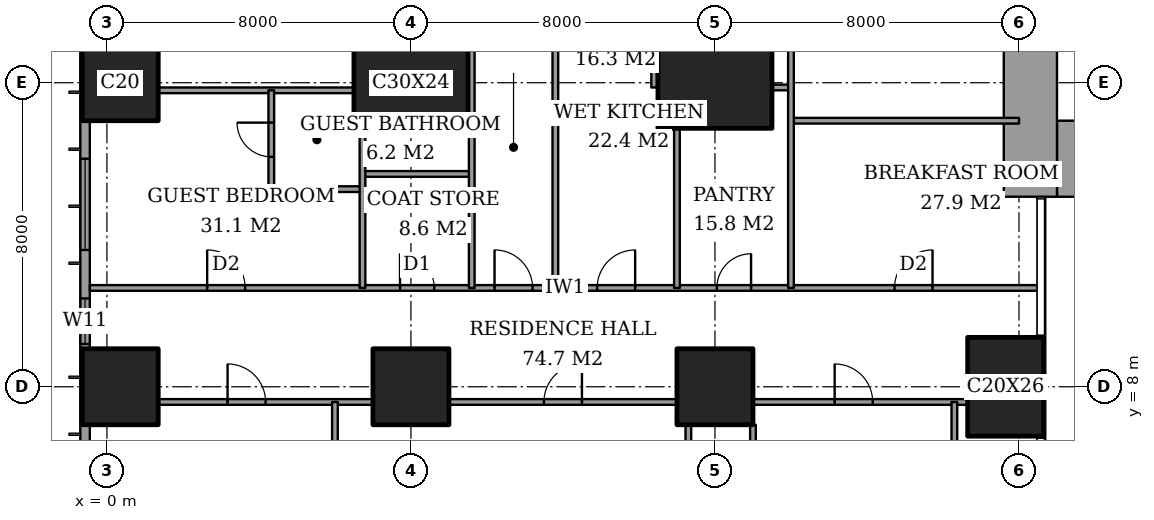
"""IFC4 building model, lengths in metres.
Left out: names, types, materials, properties, quantities, classifications, styles, units other than length and angle.
Written with IfcOpenShell. Run it as: python <this file> out.ifc"""

import sys

from ifc_helpers import new_model, si_unit, direction, frame, frame_2d, origin, origin_2d, place, context, subcontext, project, spatial, rectangle, extrude, element, fill, save


model = new_model("IFC4")
c1 = context("Model", 3, precision=1e-05, world=origin(), true_north=direction((0.0, 1.0)))
c2 = subcontext(c1, "Body", "Model", "MODEL_VIEW")
j1 = project(units=[si_unit("LENGTHUNIT", "METRE"), si_unit("PLANEANGLEUNIT", "RADIAN")], contexts=[c1])
p1 = place(None, origin())
s1 = spatial("IfcSite", under=j1, at=p1, CompositionType="ELEMENT")
p2 = place(p1, origin())
s2 = spatial("IfcBuilding", under=s1, at=p2, CompositionType="ELEMENT")
p3 = place(p2, frame((0.0, 0.0, 114.2)))
s3 = spatial("IfcBuildingStorey", under=s2, at=p3, CompositionType="ELEMENT", Elevation=114.2)
for number, where, z_axis, x_axis in (
    (1, (0.35, 8.0, 0.0), (0.0, 0.0, 1.0), (1.0, 0.0, 0.0)),
    (2, (0.35, 16.0, 0.0), (0.0, 0.0, 1.0), (1.0, 0.0, 0.0)),
    (3, (8.0, 8.0, 0.0), (0.0, 0.0, 1.0), (1.0, 0.0, 0.0)),
):
    element("IfcColumn", number, at=place(p3, frame(where, z_axis=z_axis, x_axis=x_axis)), inside=s3, PredefinedType="COLUMN", context=c2, shape_type="SweptSolid", body=[
        extrude(rectangle(XDim=2.0, YDim=2.0, at=origin_2d()), origin(), (0.0, 0.0, 1.0), 3.6),
    ])
p4 = place(p3, frame((8.0, 16.0, 0.0), z_axis=(0.0, 0.0, 1.0), x_axis=(1.0, 0.0, 0.0)))
e4 = element("IfcColumn", 4, at=p4, inside=s3, PredefinedType="COLUMN", context=c2, shape_type="SweptSolid", body=[
    extrude(rectangle(XDim=3.0, YDim=2.4, at=origin_2d()), origin(), (0.0, 0.0, 1.0), 3.6),
])
p5 = place(p3, frame((16.0, 8.0, 0.0), z_axis=(0.0, 0.0, 1.0), x_axis=(1.0, 0.0, 0.0)))
e5 = element("IfcColumn", 5, at=p5, inside=s3, PredefinedType="COLUMN", context=c2, shape_type="SweptSolid", body=[
    extrude(rectangle(XDim=2.0, YDim=2.0, at=origin_2d()), origin(), (0.0, 0.0, 1.0), 3.6),
])
p6 = place(p3, frame((16.0, 16.0, 0.0), z_axis=(0.0, 0.0, 1.0), x_axis=(1.0, 0.0, 0.0)))
e6 = element("IfcColumn", 6, at=p6, inside=s3, PredefinedType="COLUMN", context=c2, shape_type="SweptSolid", body=[
    extrude(rectangle(XDim=3.0, YDim=2.4, at=origin_2d()), origin(), (0.0, 0.0, 1.0), 3.6),
])
p7 = place(p3, frame((23.65, 8.0, 0.0), z_axis=(0.0, 0.0, 1.0), x_axis=(1.0, 0.0, 0.0)))
e7 = element("IfcColumn", 7, at=p7, inside=s3, PredefinedType="COLUMN", context=c2, shape_type="SweptSolid", body=[
    extrude(rectangle(XDim=2.0, YDim=2.6, at=origin_2d()), origin(), (0.0, 0.0, 1.0), 3.6),
])
p8 = place(p3, frame((25.0, 14.0, 0.0), z_axis=(0.0, 0.0, 1.0), x_axis=(1.0, 0.0, 0.0)))
e8 = element("IfcWall", 8, at=p8, inside=s3, PredefinedType="SHEAR", context=c2, shape_type="SweptSolid", body=[
    extrude(rectangle(XDim=3.15, YDim=2.0, at=frame_2d((1.575, 0.0))), origin(), (0.0, 0.0, 1.0), 3.6),
])
p9 = place(p3, frame((24.3, 13.0, 0.0), z_axis=(0.0, 0.0, 1.0), x_axis=(0.0, 1.0, 0.0)))
e9 = element("IfcWall", 9, at=p9, inside=s3, PredefinedType="SHEAR", context=c2, shape_type="SweptSolid", body=[
    extrude(rectangle(XDim=10.15, YDim=1.4, at=frame_2d((5.075, 0.0))), origin(), (0.0, 0.0, 1.0), 3.6),
])
p10 = place(p3, frame((-0.575, 44.825, 0.0), z_axis=(0.0, 0.0, 1.0), x_axis=(0.0, -1.0, 0.0)))
e10 = element("IfcWall", 10, at=p10, inside=s3, PredefinedType="SOLIDWALL", context=c2, shape_type="SweptSolid", body=[
    extrude(rectangle(XDim=41.65, YDim=0.25, at=frame_2d((20.825, 0.0))), origin(), (0.0, 0.0, 1.0), 3.6),
])
p11 = place(p10, frame((0.775, 0.0, 0.4)))
e11 = element("IfcOpeningElement", 11, at=p11, cuts=e10, PredefinedType="OPENING", context=c2, shape_type="SweptSolid", body=[
    extrude(rectangle(XDim=2.4, YDim=2.2, at=frame_2d((1.2, 1.1))), frame((0.0, 0.135, 0.0), z_axis=(0.0, -1.0, 0.0), x_axis=(1.0, 0.0, 0.0)), (0.0, 0.0, 1.0), 0.27),
])
p12 = place(p10, frame((6.2, 0.0, 0.4)))
e12 = element("IfcOpeningElement", 12, at=p12, cuts=e10, PredefinedType="OPENING", context=c2, shape_type="SweptSolid", body=[
    extrude(rectangle(XDim=1.2, YDim=2.2, at=frame_2d((0.6, 1.1))), frame((0.0, 0.135, 0.0), z_axis=(0.0, -1.0, 0.0), x_axis=(1.0, 0.0, 0.0)), (0.0, 0.0, 1.0), 0.27),
])
p13 = place(p10, frame((8.525, 0.0, 0.4)))
e13 = element("IfcOpeningElement", 13, at=p13, cuts=e10, PredefinedType="OPENING", context=c2, shape_type="SweptSolid", body=[
    extrude(rectangle(XDim=2.4, YDim=2.2, at=frame_2d((1.2, 1.1))), frame((0.0, 0.135, 0.0), z_axis=(0.0, -1.0, 0.0), x_axis=(1.0, 0.0, 0.0)), (0.0, 0.0, 1.0), 0.27),
])
p14 = place(p10, frame((15.625, 0.0, 0.4)))
e14 = element("IfcOpeningElement", 14, at=p14, cuts=e10, PredefinedType="OPENING", context=c2, shape_type="SweptSolid", body=[
    extrude(rectangle(XDim=2.4, YDim=2.2, at=frame_2d((1.2, 1.1))), frame((0.0, 0.135, 0.0), z_axis=(0.0, -1.0, 0.0), x_axis=(1.0, 0.0, 0.0)), (0.0, 0.0, 1.0), 0.27),
])
p15 = place(p10, frame((23.625, 0.0, 0.4)))
e15 = element("IfcOpeningElement", 15, at=p15, cuts=e10, PredefinedType="OPENING", context=c2, shape_type="SweptSolid", body=[
    extrude(rectangle(XDim=2.4, YDim=2.2, at=frame_2d((1.2, 1.1))), frame((0.0, 0.135, 0.0), z_axis=(0.0, -1.0, 0.0), x_axis=(1.0, 0.0, 0.0)), (0.0, 0.0, 1.0), 0.27),
])
p16 = place(p10, frame((30.825, 0.0, 0.4)))
e16 = element("IfcOpeningElement", 16, at=p16, cuts=e10, PredefinedType="OPENING", context=c2, shape_type="SweptSolid", body=[
    extrude(rectangle(XDim=2.4, YDim=2.2, at=frame_2d((1.2, 1.1))), frame((0.0, 0.135, 0.0), z_axis=(0.0, -1.0, 0.0), x_axis=(1.0, 0.0, 0.0)), (0.0, 0.0, 1.0), 0.27),
])
p17 = place(p10, frame((34.5, 0.0, 0.4)))
e17 = element("IfcOpeningElement", 17, at=p17, cuts=e10, PredefinedType="OPENING", context=c2, shape_type="SweptSolid", body=[
    extrude(rectangle(XDim=1.2, YDim=2.2, at=frame_2d((0.6, 1.1))), frame((0.0, 0.135, 0.0), z_axis=(0.0, -1.0, 0.0), x_axis=(1.0, 0.0, 0.0)), (0.0, 0.0, 1.0), 0.27),
])
p18 = place(p10, frame((38.475, 0.0, 0.4)))
e18 = element("IfcOpeningElement", 18, at=p18, cuts=e10, PredefinedType="OPENING", context=c2, shape_type="SweptSolid", body=[
    extrude(rectangle(XDim=2.4, YDim=2.2, at=frame_2d((1.2, 1.1))), frame((0.0, 0.135, 0.0), z_axis=(0.0, -1.0, 0.0), x_axis=(1.0, 0.0, 0.0)), (0.0, 0.0, 1.0), 0.27),
])
p19 = place(p3, frame((1.35, 7.6, 0.0), z_axis=(0.0, 0.0, 1.0), x_axis=(1.0, 0.0, 0.0)))
e19 = element("IfcWall", 19, at=p19, inside=s3, PredefinedType="PARTITIONING", context=c2, shape_type="SweptSolid", body=[
    extrude(rectangle(XDim=5.65, YDim=0.15, at=frame_2d((2.825, 0.0))), origin(), (0.0, 0.0, 1.0), 3.35),
])
p20 = place(p19, frame((1.825, 0.0, 0.0)))
e20 = element("IfcOpeningElement", 20, at=p20, cuts=e19, PredefinedType="OPENING", context=c2, shape_type="SweptSolid", body=[
    extrude(rectangle(XDim=1.0, YDim=2.1, at=frame_2d((0.5, 1.05))), frame((0.0, 0.085, 0.0), z_axis=(0.0, -1.0, 0.0), x_axis=(1.0, 0.0, 0.0)), (0.0, 0.0, 1.0), 0.17),
])
p21 = place(p3, frame((9.0, 7.6, 0.0), z_axis=(0.0, 0.0, 1.0), x_axis=(1.0, 0.0, 0.0)))
e21 = element("IfcWall", 21, at=p21, inside=s3, PredefinedType="PARTITIONING", context=c2, shape_type="SweptSolid", body=[
    extrude(rectangle(XDim=6.0, YDim=0.15, at=frame_2d((3.0, 0.0))), origin(), (0.0, 0.0, 1.0), 3.35),
])
p22 = place(p21, frame((2.5, 0.0, 0.0)))
e22 = element("IfcOpeningElement", 22, at=p22, cuts=e21, PredefinedType="OPENING", context=c2, shape_type="SweptSolid", body=[
    extrude(rectangle(XDim=1.0, YDim=2.1, at=frame_2d((0.5, 1.05))), frame((0.0, 0.085, 0.0), z_axis=(0.0, -1.0, 0.0), x_axis=(1.0, 0.0, 0.0)), (0.0, 0.0, 1.0), 0.17),
])
p23 = place(p3, frame((17.0, 7.6, 0.0), z_axis=(0.0, 0.0, 1.0), x_axis=(1.0, 0.0, 0.0)))
e23 = element("IfcWall", 23, at=p23, inside=s3, PredefinedType="PARTITIONING", context=c2, shape_type="SweptSolid", body=[
    extrude(rectangle(XDim=5.65, YDim=0.15, at=frame_2d((2.825, 0.0))), origin(), (0.0, 0.0, 1.0), 3.35),
])
p24 = place(p23, frame((2.15, 0.0, 0.0)))
e24 = element("IfcOpeningElement", 24, at=p24, cuts=e23, PredefinedType="OPENING", context=c2, shape_type="SweptSolid", body=[
    extrude(rectangle(XDim=1.0, YDim=2.1, at=frame_2d((0.5, 1.05))), frame((0.0, 0.085, 0.0), z_axis=(0.0, -1.0, 0.0), x_axis=(1.0, 0.0, 0.0)), (0.0, 0.0, 1.0), 0.17),
])
p25 = place(p3, frame((-0.45, 10.6, 0.0), z_axis=(0.0, 0.0, 1.0), x_axis=(1.0, 0.0, 0.0)))
e25 = element("IfcWall", 25, at=p25, inside=s3, PredefinedType="PARTITIONING", context=c2, shape_type="SweptSolid", body=[
    extrude(rectangle(XDim=25.011, YDim=0.15, at=frame_2d((12.505, 0.0))), origin(), (0.0, 0.0, 1.0), 3.35),
])
p26 = place(p25, frame((10.65, 0.0, 0.0)))
e26 = element("IfcOpeningElement", 26, at=p26, cuts=e25, PredefinedType="OPENING", context=c2, shape_type="SweptSolid", body=[
    extrude(rectangle(XDim=1.0, YDim=2.1, at=frame_2d((0.5, 1.05))), frame((0.0, 0.085, 0.0), z_axis=(0.0, -1.0, 0.0), x_axis=(1.0, 0.0, 0.0)), (0.0, 0.0, 1.0), 0.17),
])
p27 = place(p25, frame((3.087, 0.0, 0.0)))
e27 = element("IfcOpeningElement", 27, at=p27, cuts=e25, PredefinedType="OPENING", context=c2, shape_type="SweptSolid", body=[
    extrude(rectangle(XDim=1.0, YDim=2.1, at=frame_2d((0.5, 1.05))), frame((0.0, 0.085, 0.0), z_axis=(0.0, -1.0, 0.0), x_axis=(1.0, 0.0, 0.0)), (0.0, 0.0, 1.0), 0.17),
])
p28 = place(p25, frame((8.163, 0.0, 0.0)))
e28 = element("IfcOpeningElement", 28, at=p28, cuts=e25, PredefinedType="OPENING", context=c2, shape_type="SweptSolid", body=[
    extrude(rectangle(XDim=0.9, YDim=2.1, at=frame_2d((0.45, 1.05))), frame((0.0, 0.085, 0.0), z_axis=(0.0, -1.0, 0.0), x_axis=(1.0, 0.0, 0.0)), (0.0, 0.0, 1.0), 0.17),
])
p29 = place(p25, frame((13.35, 0.0, 0.0)))
e29 = element("IfcOpeningElement", 29, at=p29, cuts=e25, PredefinedType="OPENING", context=c2, shape_type="SweptSolid", body=[
    extrude(rectangle(XDim=1.0, YDim=2.1, at=frame_2d((0.5, 1.05))), frame((0.0, 0.085, 0.0), z_axis=(0.0, -1.0, 0.0), x_axis=(1.0, 0.0, 0.0)), (0.0, 0.0, 1.0), 0.17),
])
p30 = place(p25, frame((16.5, 0.0, 0.0)))
e30 = element("IfcOpeningElement", 30, at=p30, cuts=e25, PredefinedType="OPENING", context=c2, shape_type="SweptSolid", body=[
    extrude(rectangle(XDim=0.9, YDim=2.1, at=frame_2d((0.45, 1.05))), frame((0.0, 0.085, 0.0), z_axis=(0.0, -1.0, 0.0), x_axis=(1.0, 0.0, 0.0)), (0.0, 0.0, 1.0), 0.17),
])
p31 = place(p25, frame((21.175, 0.0, 0.0)))
e31 = element("IfcOpeningElement", 31, at=p31, cuts=e25, PredefinedType="OPENING", context=c2, shape_type="SweptSolid", body=[
    extrude(rectangle(XDim=1.0, YDim=2.1, at=frame_2d((0.5, 1.05))), frame((0.0, 0.085, 0.0), z_axis=(0.0, -1.0, 0.0), x_axis=(1.0, 0.0, 0.0)), (0.0, 0.0, 1.0), 0.17),
])
p32 = place(p3, frame((4.325, 13.2, 0.0), z_axis=(0.0, 0.0, 1.0), x_axis=(1.0, 0.0, 0.0)))
e32 = element("IfcWall", 32, at=p32, inside=s3, PredefinedType="PARTITIONING", context=c2, shape_type="SweptSolid", body=[
    extrude(rectangle(XDim=2.4, YDim=0.15, at=frame_2d((1.2, 0.0))), origin(), (0.0, 0.0, 1.0), 3.35),
])
p33 = place(p3, frame((6.725, 13.6, 0.0), z_axis=(0.0, 0.0, 1.0), x_axis=(1.0, 0.0, 0.0)))
e33 = element("IfcWall", 33, at=p33, inside=s3, PredefinedType="PARTITIONING", context=c2, shape_type="SweptSolid", body=[
    extrude(rectangle(XDim=2.875, YDim=0.15, at=frame_2d((1.438, 0.0))), origin(), (0.0, 0.0, 1.0), 3.35),
])
p34 = place(p3, frame((18.0, 15.0, 0.0), z_axis=(0.0, 0.0, 1.0), x_axis=(1.0, 0.0, 0.0)))
e34 = element("IfcWall", 34, at=p34, inside=s3, PredefinedType="PARTITIONING", context=c2, shape_type="SweptSolid", body=[
    extrude(rectangle(XDim=6.0, YDim=0.15, at=frame_2d((3.0, 0.0))), origin(), (0.0, 0.0, 1.0), 3.35),
])
p35 = place(p3, frame((1.35, 15.8, 0.0), z_axis=(0.0, 0.0, 1.0), x_axis=(1.0, 0.0, 0.0)))
e35 = element("IfcWall", 35, at=p35, inside=s3, PredefinedType="PARTITIONING", context=c2, shape_type="SweptSolid", body=[
    extrude(rectangle(XDim=5.15, YDim=0.15, at=frame_2d((2.575, 0.0))), origin(), (0.0, 0.0, 1.0), 3.35),
])
p36 = place(p3, frame((17.5, 15.875, 0.0), z_axis=(0.0, 0.0, 1.0), x_axis=(1.0, 0.0, 0.0)))
e36 = element("IfcWall", 36, at=p36, inside=s3, PredefinedType="PARTITIONING", context=c2, shape_type="SweptSolid", body=[
    extrude(rectangle(XDim=0.5, YDim=0.15, at=frame_2d((0.25, 0.0))), origin(), (0.0, 0.0, 1.0), 2.634),
])
p37 = place(p3, frame((4.325, 13.2, 0.0), z_axis=(0.0, 0.0, 1.0), x_axis=(0.0, 1.0, 0.0)))
e37 = element("IfcWall", 37, at=p37, inside=s3, PredefinedType="PARTITIONING", context=c2, shape_type="SweptSolid", body=[
    extrude(rectangle(XDim=2.6, YDim=0.15, at=frame_2d((1.3, 0.0))), origin(), (0.0, 0.0, 1.0), 3.35),
])
p38 = place(p37, frame((0.85, 0.0, 0.0)))
e38 = element("IfcOpeningElement", 38, at=p38, cuts=e37, PredefinedType="OPENING", context=c2, shape_type="SweptSolid", body=[
    extrude(rectangle(XDim=0.9, YDim=2.1, at=frame_2d((0.45, 1.05))), frame((0.0, 0.085, 0.0), z_axis=(0.0, -1.0, 0.0), x_axis=(1.0, 0.0, 0.0)), (0.0, 0.0, 1.0), 0.17),
])
p39 = place(p3, frame((6.0, -0.45, 0.0), z_axis=(0.0, 0.0, 1.0), x_axis=(0.0, 1.0, 0.0)))
e39 = element("IfcWall", 39, at=p39, inside=s3, PredefinedType="PARTITIONING", context=c2, shape_type="SweptSolid", body=[
    extrude(rectangle(XDim=8.05, YDim=0.15, at=frame_2d((4.025, 0.0))), origin(), (0.0, 0.0, 1.0), 3.35),
])
p40 = place(p3, frame((6.725, 10.6, 0.0), z_axis=(0.0, 0.0, 1.0), x_axis=(0.0, 1.0, 0.0)))
e40 = element("IfcWall", 40, at=p40, inside=s3, PredefinedType="PARTITIONING", context=c2, shape_type="SweptSolid", body=[
    extrude(rectangle(XDim=4.2, YDim=0.15, at=frame_2d((2.1, 0.0))), origin(), (0.0, 0.0, 1.0), 3.35),
])
p41 = place(p3, frame((9.6, 10.6, 0.0), z_axis=(0.0, 0.0, 1.0), x_axis=(0.0, 1.0, 0.0)))
e41 = element("IfcWall", 41, at=p41, inside=s3, PredefinedType="PARTITIONING", context=c2, shape_type="SweptSolid", body=[
    extrude(rectangle(XDim=11.0, YDim=0.15, at=frame_2d((5.5, 0.0))), origin(), (0.0, 0.0, 1.0), 3.35),
])
p42 = place(p41, frame((8.7, 0.0, 0.0)))
e42 = element("IfcOpeningElement", 42, at=p42, cuts=e41, PredefinedType="OPENING", context=c2, shape_type="SweptSolid", body=[
    extrude(rectangle(XDim=1.0, YDim=2.1, at=frame_2d((0.5, 1.05))), frame((0.0, 0.085, 0.0), z_axis=(0.0, -1.0, 0.0), x_axis=(1.0, 0.0, 0.0)), (0.0, 0.0, 1.0), 0.17),
])
p43 = place(p3, frame((11.8, 10.6, 0.0), z_axis=(0.0, 0.0, 1.0), x_axis=(0.0, 1.0, 0.0)))
e43 = element("IfcWall", 43, at=p43, inside=s3, PredefinedType="PARTITIONING", context=c2, shape_type="SweptSolid", body=[
    extrude(rectangle(XDim=7.4, YDim=0.15, at=frame_2d((3.7, 0.0))), origin(), (0.0, 0.0, 1.0), 3.35),
])
p44 = place(p3, frame((14.4, 15.875, 0.0), z_axis=(0.0, 0.0, 1.0), x_axis=(0.0, 1.0, 0.0)))
e44 = element("IfcWall", 44, at=p44, inside=s3, PredefinedType="PARTITIONING", context=c2, shape_type="SweptSolid", body=[
    extrude(rectangle(XDim=2.125, YDim=0.15, at=frame_2d((1.062, 0.0))), origin(), (0.0, 0.0, 1.0), 3.35),
])
p45 = place(p3, frame((15.0, 10.6, 0.0), z_axis=(0.0, 0.0, 1.0), x_axis=(0.0, 1.0, 0.0)))
e45 = element("IfcWall", 45, at=p45, inside=s3, PredefinedType="PARTITIONING", context=c2, shape_type="SweptSolid", body=[
    extrude(rectangle(XDim=4.2, YDim=0.15, at=frame_2d((2.1, 0.0))), origin(), (0.0, 0.0, 1.0), 3.35),
])
p46 = place(p3, frame((15.3, 1.35, 0.0), z_axis=(0.0, 0.0, 1.0), x_axis=(0.0, 1.0, 0.0)))
e46 = element("IfcWall", 46, at=p46, inside=s3, PredefinedType="PARTITIONING", context=c2, shape_type="SweptSolid", body=[
    extrude(rectangle(XDim=5.65, YDim=0.15, at=frame_2d((2.825, 0.0))), origin(), (0.0, 0.0, 1.0), 3.35),
])
p47 = place(p46, frame((2.375, 0.0, 0.0)))
e47 = element("IfcOpeningElement", 47, at=p47, cuts=e46, PredefinedType="OPENING", context=c2, shape_type="SweptSolid", body=[
    extrude(rectangle(XDim=0.9, YDim=2.1, at=frame_2d((0.45, 1.05))), frame((0.0, 0.085, 0.0), z_axis=(0.0, -1.0, 0.0), x_axis=(1.0, 0.0, 0.0)), (0.0, 0.0, 1.0), 0.17),
])
p48 = place(p3, frame((17.0, 1.35, 0.0), z_axis=(0.0, 0.0, 1.0), x_axis=(0.0, 1.0, 0.0)))
e48 = element("IfcWall", 48, at=p48, inside=s3, PredefinedType="PARTITIONING", context=c2, shape_type="SweptSolid", body=[
    extrude(rectangle(XDim=5.65, YDim=0.15, at=frame_2d((2.825, 0.0))), origin(), (0.0, 0.0, 1.0), 3.35),
])
p49 = place(p3, frame((18.0, 10.6, 0.0), z_axis=(0.0, 0.0, 1.0), x_axis=(0.0, 1.0, 0.0)))
e49 = element("IfcWall", 49, at=p49, inside=s3, PredefinedType="PARTITIONING", context=c2, shape_type="SweptSolid", body=[
    extrude(rectangle(XDim=7.4, YDim=0.15, at=frame_2d((3.7, 0.0))), origin(), (0.0, 0.0, 1.0), 3.35),
])
p50 = place(p3, frame((22.3, -0.45, 0.0), z_axis=(0.0, 0.0, 1.0), x_axis=(0.0, 1.0, 0.0)))
e50 = element("IfcWall", 50, at=p50, inside=s3, PredefinedType="PARTITIONING", context=c2, shape_type="SweptSolid", body=[
    extrude(rectangle(XDim=8.05, YDim=0.15, at=frame_2d((4.025, 0.0))), origin(), (0.0, 0.0, 1.0), 3.35),
])
p51 = place(p50, frame((3.575, 0.0, 0.0)))
e51 = element("IfcOpeningElement", 51, at=p51, cuts=e50, PredefinedType="OPENING", context=c2, shape_type="SweptSolid", body=[
    extrude(rectangle(XDim=0.9, YDim=2.1, at=frame_2d((0.45, 1.05))), frame((0.0, 0.085, 0.0), z_axis=(0.0, -1.0, 0.0), x_axis=(1.0, 0.0, 0.0)), (0.0, 0.0, 1.0), 0.17),
])
p52 = place(p16, origin())
e52 = element("IfcWindow", 52, at=p52, inside=s3, PartitioningType="SINGLE_PANEL", PredefinedType="WINDOW", context=c2, shape_type="SweptSolid", body=[
    extrude(rectangle(XDim=2.4, YDim=2.2, at=frame_2d((1.2, 1.1))), frame((0.0, 0.03, 0.0), z_axis=(0.0, -1.0, 0.0), x_axis=(1.0, 0.0, 0.0)), (0.0, 0.0, 1.0), 0.06),
])
fill(e16, e52)
p53 = place(p17, origin())
e53 = element("IfcWindow", 53, at=p53, inside=s3, PartitioningType="SINGLE_PANEL", PredefinedType="WINDOW", context=c2, shape_type="SweptSolid", body=[
    extrude(rectangle(XDim=1.2, YDim=2.2, at=frame_2d((0.6, 1.1))), frame((0.0, 0.03, 0.0), z_axis=(0.0, -1.0, 0.0), x_axis=(1.0, 0.0, 0.0)), (0.0, 0.0, 1.0), 0.06),
])
fill(e17, e53)
p54 = place(p20, origin())
e54 = element("IfcDoor", 54, at=p54, inside=s3, OperationType="SINGLE_SWING_RIGHT", PredefinedType="DOOR", context=c2, shape_type="SweptSolid", body=[
    extrude(rectangle(XDim=1.0, YDim=2.1, at=frame_2d((0.5, 1.05))), frame((0.0, 0.025, 0.0), z_axis=(0.0, -1.0, 0.0), x_axis=(1.0, 0.0, 0.0)), (0.0, 0.0, 1.0), 0.05),
])
fill(e20, e54)
p55 = place(p22, origin())
e55 = element("IfcDoor", 55, at=p55, inside=s3, OperationType="SINGLE_SWING_LEFT", PredefinedType="DOOR", context=c2, shape_type="SweptSolid", body=[
    extrude(rectangle(XDim=1.0, YDim=2.1, at=frame_2d((0.5, 1.05))), frame((0.0, 0.025, 0.0), z_axis=(0.0, -1.0, 0.0), x_axis=(1.0, 0.0, 0.0)), (0.0, 0.0, 1.0), 0.05),
])
fill(e22, e55)
p56 = place(p24, origin())
e56 = element("IfcDoor", 56, at=p56, inside=s3, OperationType="SINGLE_SWING_RIGHT", PredefinedType="DOOR", context=c2, shape_type="SweptSolid", body=[
    extrude(rectangle(XDim=1.0, YDim=2.1, at=frame_2d((0.5, 1.05))), frame((0.0, 0.025, 0.0), z_axis=(0.0, -1.0, 0.0), x_axis=(1.0, 0.0, 0.0)), (0.0, 0.0, 1.0), 0.05),
])
fill(e24, e56)
p57 = place(p26, origin())
e57 = element("IfcDoor", 57, at=p57, inside=s3, OperationType="SINGLE_SWING_RIGHT", PredefinedType="DOOR", context=c2, shape_type="SweptSolid", body=[
    extrude(rectangle(XDim=1.0, YDim=2.1, at=frame_2d((0.5, 1.05))), frame((0.0, 0.025, 0.0), z_axis=(0.0, -1.0, 0.0), x_axis=(1.0, 0.0, 0.0)), (0.0, 0.0, 1.0), 0.05),
])
fill(e26, e57)
p58 = place(p38, origin())
e58 = element("IfcDoor", 58, at=p58, inside=s3, OperationType="SINGLE_SWING_LEFT", PredefinedType="DOOR", context=c2, shape_type="SweptSolid", body=[
    extrude(rectangle(XDim=0.9, YDim=2.1, at=frame_2d((0.45, 1.05))), frame((0.0, 0.025, 0.0), z_axis=(0.0, -1.0, 0.0), x_axis=(1.0, 0.0, 0.0)), (0.0, 0.0, 1.0), 0.05),
])
fill(e38, e58)
p59 = place(p27, origin())
e59 = element("IfcDoor", 59, at=p59, inside=s3, OperationType="SINGLE_SWING_RIGHT", PredefinedType="DOOR", context=c2, shape_type="SweptSolid", body=[
    extrude(rectangle(XDim=1.0, YDim=2.1, at=frame_2d((0.5, 1.05))), frame((0.0, 0.025, 0.0), z_axis=(0.0, -1.0, 0.0), x_axis=(1.0, 0.0, 0.0)), (0.0, 0.0, 1.0), 0.05),
])
fill(e27, e59)
p60 = place(p28, origin())
e60 = element("IfcDoor", 60, at=p60, inside=s3, OperationType="SINGLE_SWING_RIGHT", PredefinedType="DOOR", context=c2, shape_type="SweptSolid", body=[
    extrude(rectangle(XDim=0.9, YDim=2.1, at=frame_2d((0.45, 1.05))), frame((0.0, 0.025, 0.0), z_axis=(0.0, -1.0, 0.0), x_axis=(1.0, 0.0, 0.0)), (0.0, 0.0, 1.0), 0.05),
])
fill(e28, e60)
p61 = place(p29, origin())
e61 = element("IfcDoor", 61, at=p61, inside=s3, OperationType="SINGLE_SWING_LEFT", PredefinedType="DOOR", context=c2, shape_type="SweptSolid", body=[
    extrude(rectangle(XDim=1.0, YDim=2.1, at=frame_2d((0.5, 1.05))), frame((0.0, 0.025, 0.0), z_axis=(0.0, -1.0, 0.0), x_axis=(1.0, 0.0, 0.0)), (0.0, 0.0, 1.0), 0.05),
])
fill(e29, e61)
p62 = place(p30, origin())
e62 = element("IfcDoor", 62, at=p62, inside=s3, OperationType="SINGLE_SWING_LEFT", PredefinedType="DOOR", context=c2, shape_type="SweptSolid", body=[
    extrude(rectangle(XDim=0.9, YDim=2.1, at=frame_2d((0.45, 1.05))), frame((0.0, 0.025, 0.0), z_axis=(0.0, -1.0, 0.0), x_axis=(1.0, 0.0, 0.0)), (0.0, 0.0, 1.0), 0.05),
])
fill(e30, e62)
p63 = place(p31, origin())
e63 = element("IfcDoor", 63, at=p63, inside=s3, OperationType="SINGLE_SWING_LEFT", PredefinedType="DOOR", context=c2, shape_type="SweptSolid", body=[
    extrude(rectangle(XDim=1.0, YDim=2.1, at=frame_2d((0.5, 1.05))), frame((0.0, 0.025, 0.0), z_axis=(0.0, -1.0, 0.0), x_axis=(1.0, 0.0, 0.0)), (0.0, 0.0, 1.0), 0.05),
])
fill(e31, e63)
save(model, sys.argv[1])
